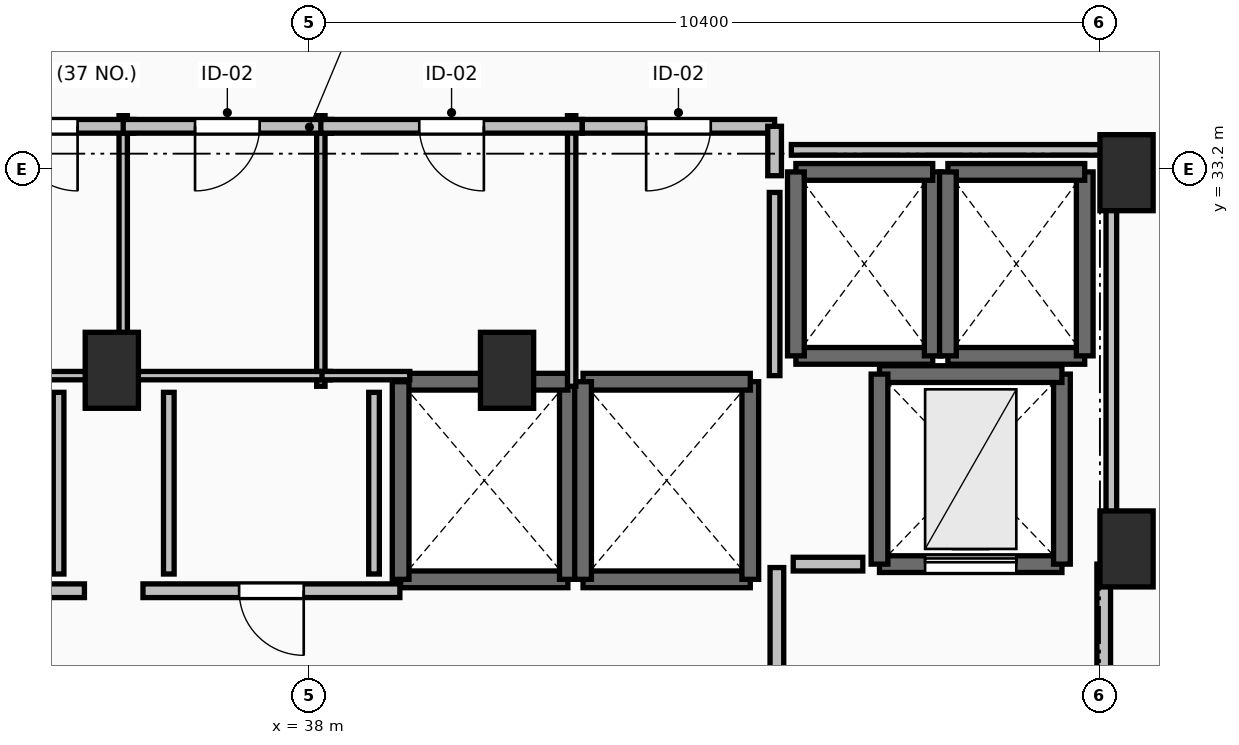
"""IFC4 building model, lengths in metres.
Left out: names, types, materials, properties, quantities, classifications, styles, units other than length and angle.
Written with IfcOpenShell. Run it as: python <this file> out.ifc"""

import sys

from ifc_helpers import new_model, si_unit, direction, frame, frame_2d, origin, origin_2d, place, context, subcontext, project, spatial, rectangle, extrude, element, fill, save


model = new_model("IFC4")
c1 = context("Model", 3, precision=1e-05, world=origin(), true_north=direction((0.0, 1.0)))
c2 = subcontext(c1, "Body", "Model", "MODEL_VIEW")
j1 = project(units=[si_unit("LENGTHUNIT", "METRE"), si_unit("PLANEANGLEUNIT", "RADIAN")], contexts=[c1])
p1 = place(None, origin())
s1 = spatial("IfcSite", under=j1, at=p1, CompositionType="ELEMENT")
p2 = place(p1, origin())
s2 = spatial("IfcBuilding", under=s1, at=p2, CompositionType="ELEMENT")
p3 = place(p2, frame((0.0, 0.0, 186.1)))
s3 = spatial("IfcBuildingStorey", under=s2, at=p3, CompositionType="ELEMENT", Elevation=186.1)
for number, where, z_axis, x_axis in (
    (1, (48.75, 33.15, 0.0), (0.0, 0.0, 1.0), (1.0, 0.0, 0.0)),
    (2, (48.75, 28.2, 0.0), (0.0, 0.0, 1.0), (1.0, 0.0, 0.0)),
    (3, (35.4, 30.55, 0.0), (0.0, 0.0, 1.0), (1.0, 0.0, 0.0)),
    (4, (40.6, 30.55, 0.0), (0.0, 0.0, 1.0), (1.0, 0.0, 0.0)),
):
    element("IfcColumn", number, at=place(p3, frame(where, z_axis=z_axis, x_axis=x_axis)), inside=s3, PredefinedType="PILASTER", context=c2, shape_type="SweptSolid", body=[
        extrude(rectangle(XDim=0.7, YDim=1.0, at=origin_2d()), origin(), (0.0, 0.0, 1.0), 3.5),
    ])
p4 = place(p3, frame((39.2, 27.8, 0.0), z_axis=(0.0, 0.0, 1.0), x_axis=(1.0, 0.0, 0.0)))
e5 = element("IfcWall", 5, at=p4, inside=s3, PredefinedType="SOLIDWALL", context=c2, shape_type="SweptSolid", body=[
    extrude(rectangle(XDim=2.2, YDim=0.22, at=frame_2d((1.1, 0.0))), origin(), (0.0, 0.0, 1.0), 3.24),
])
p5 = place(p3, frame((41.4, 27.8, 0.0), z_axis=(0.0, 0.0, 1.0), x_axis=(0.0, 1.0, 0.0)))
e6 = element("IfcWall", 6, at=p5, inside=s3, PredefinedType="SOLIDWALL", context=c2, shape_type="SweptSolid", body=[
    extrude(rectangle(XDim=2.6, YDim=0.22, at=frame_2d((1.3, 0.0))), origin(), (0.0, 0.0, 1.0), 3.24),
])
p6 = place(p3, frame((41.4, 30.4, 0.0), z_axis=(0.0, 0.0, 1.0), x_axis=(-1.0, 0.0, 0.0)))
e7 = element("IfcWall", 7, at=p6, inside=s3, PredefinedType="SOLIDWALL", context=c2, shape_type="SweptSolid", body=[
    extrude(rectangle(XDim=2.2, YDim=0.22, at=frame_2d((1.1, 0.0))), origin(), (0.0, 0.0, 1.0), 3.24),
])
p7 = place(p3, frame((39.2, 30.4, 0.0), z_axis=(0.0, 0.0, 1.0), x_axis=(0.0, -1.0, 0.0)))
e8 = element("IfcWall", 8, at=p7, inside=s3, PredefinedType="SOLIDWALL", context=c2, shape_type="SweptSolid", body=[
    extrude(rectangle(XDim=2.6, YDim=0.22, at=frame_2d((1.3, 0.0))), origin(), (0.0, 0.0, 1.0), 3.24),
])
p8 = place(p3, frame((41.6, 27.8, 0.0), z_axis=(0.0, 0.0, 1.0), x_axis=(1.0, 0.0, 0.0)))
e9 = element("IfcWall", 9, at=p8, inside=s3, PredefinedType="SOLIDWALL", context=c2, shape_type="SweptSolid", body=[
    extrude(rectangle(XDim=2.2, YDim=0.22, at=frame_2d((1.1, 0.0))), origin(), (0.0, 0.0, 1.0), 3.24),
])
p9 = place(p3, frame((43.8, 27.8, 0.0), z_axis=(0.0, 0.0, 1.0), x_axis=(0.0, 1.0, 0.0)))
e10 = element("IfcWall", 10, at=p9, inside=s3, PredefinedType="SOLIDWALL", context=c2, shape_type="SweptSolid", body=[
    extrude(rectangle(XDim=2.6, YDim=0.22, at=frame_2d((1.3, 0.0))), origin(), (0.0, 0.0, 1.0), 3.24),
])
p10 = place(p3, frame((43.8, 30.4, 0.0), z_axis=(0.0, 0.0, 1.0), x_axis=(-1.0, 0.0, 0.0)))
e11 = element("IfcWall", 11, at=p10, inside=s3, PredefinedType="SOLIDWALL", context=c2, shape_type="SweptSolid", body=[
    extrude(rectangle(XDim=2.2, YDim=0.22, at=frame_2d((1.1, 0.0))), origin(), (0.0, 0.0, 1.0), 3.24),
])
p11 = place(p3, frame((41.6, 30.4, 0.0), z_axis=(0.0, 0.0, 1.0), x_axis=(0.0, -1.0, 0.0)))
e12 = element("IfcWall", 12, at=p11, inside=s3, PredefinedType="SOLIDWALL", context=c2, shape_type="SweptSolid", body=[
    extrude(rectangle(XDim=2.6, YDim=0.22, at=frame_2d((1.3, 0.0))), origin(), (0.0, 0.0, 1.0), 3.24),
])
p12 = place(p3, frame((44.4, 30.74, 0.0), z_axis=(0.0, 0.0, 1.0), x_axis=(1.0, 0.0, 0.0)))
e13 = element("IfcWall", 13, at=p12, inside=s3, PredefinedType="SOLIDWALL", context=c2, shape_type="SweptSolid", body=[
    extrude(rectangle(XDim=1.8, YDim=0.22, at=frame_2d((0.9, 0.0))), origin(), (0.0, 0.0, 1.0), 3.24),
])
p13 = place(p3, frame((46.2, 30.74, 0.0), z_axis=(0.0, 0.0, 1.0), x_axis=(0.0, 1.0, 0.0)))
e14 = element("IfcWall", 14, at=p13, inside=s3, PredefinedType="SOLIDWALL", context=c2, shape_type="SweptSolid", body=[
    extrude(rectangle(XDim=2.42, YDim=0.22, at=frame_2d((1.21, 0.0))), origin(), (0.0, 0.0, 1.0), 3.24),
])
p14 = place(p3, frame((46.2, 33.16, 0.0), z_axis=(0.0, 0.0, 1.0), x_axis=(-1.0, 0.0, 0.0)))
e15 = element("IfcWall", 15, at=p14, inside=s3, PredefinedType="SOLIDWALL", context=c2, shape_type="SweptSolid", body=[
    extrude(rectangle(XDim=1.8, YDim=0.22, at=frame_2d((0.9, 0.0))), origin(), (0.0, 0.0, 1.0), 3.24),
])
p15 = place(p3, frame((44.4, 33.16, 0.0), z_axis=(0.0, 0.0, 1.0), x_axis=(0.0, -1.0, 0.0)))
e16 = element("IfcWall", 16, at=p15, inside=s3, PredefinedType="SOLIDWALL", context=c2, shape_type="SweptSolid", body=[
    extrude(rectangle(XDim=2.42, YDim=0.22, at=frame_2d((1.21, 0.0))), origin(), (0.0, 0.0, 1.0), 3.24),
])
p16 = place(p3, frame((46.4, 30.74, 0.0), z_axis=(0.0, 0.0, 1.0), x_axis=(1.0, 0.0, 0.0)))
e17 = element("IfcWall", 17, at=p16, inside=s3, PredefinedType="SOLIDWALL", context=c2, shape_type="SweptSolid", body=[
    extrude(rectangle(XDim=1.8, YDim=0.22, at=frame_2d((0.9, 0.0))), origin(), (0.0, 0.0, 1.0), 3.24),
])
p17 = place(p3, frame((48.2, 30.74, 0.0), z_axis=(0.0, 0.0, 1.0), x_axis=(0.0, 1.0, 0.0)))
e18 = element("IfcWall", 18, at=p17, inside=s3, PredefinedType="SOLIDWALL", context=c2, shape_type="SweptSolid", body=[
    extrude(rectangle(XDim=2.42, YDim=0.22, at=frame_2d((1.21, 0.0))), origin(), (0.0, 0.0, 1.0), 3.24),
])
p18 = place(p3, frame((48.2, 33.16, 0.0), z_axis=(0.0, 0.0, 1.0), x_axis=(-1.0, 0.0, 0.0)))
e19 = element("IfcWall", 19, at=p18, inside=s3, PredefinedType="SOLIDWALL", context=c2, shape_type="SweptSolid", body=[
    extrude(rectangle(XDim=1.8, YDim=0.22, at=frame_2d((0.9, 0.0))), origin(), (0.0, 0.0, 1.0), 3.24),
])
p19 = place(p3, frame((46.4, 33.16, 0.0), z_axis=(0.0, 0.0, 1.0), x_axis=(0.0, -1.0, 0.0)))
e20 = element("IfcWall", 20, at=p19, inside=s3, PredefinedType="SOLIDWALL", context=c2, shape_type="SweptSolid", body=[
    extrude(rectangle(XDim=2.42, YDim=0.22, at=frame_2d((1.21, 0.0))), origin(), (0.0, 0.0, 1.0), 3.24),
])
p20 = place(p3, frame((45.5, 28.0, 0.0), z_axis=(0.0, 0.0, 1.0), x_axis=(1.0, 0.0, 0.0)))
e21 = element("IfcWall", 21, at=p20, inside=s3, PredefinedType="SHEAR", context=c2, shape_type="SweptSolid", body=[
    extrude(rectangle(XDim=2.4, YDim=0.22, at=frame_2d((1.2, 0.0))), origin(), (0.0, 0.0, 1.0), 3.24),
])
p21 = place(p20, frame((0.6, 0.0, 0.0)))
e22 = element("IfcOpeningElement", 22, at=p21, cuts=e21, PredefinedType="OPENING", context=c2, shape_type="SweptSolid", body=[
    extrude(rectangle(XDim=1.2, YDim=2.2, at=frame_2d((0.6, 1.1))), frame((0.0, 0.125, 0.0), z_axis=(0.0, -1.0, 0.0), x_axis=(1.0, 0.0, 0.0)), (0.0, 0.0, 1.0), 0.25),
])
p22 = place(p3, frame((47.9, 28.0, 0.0), z_axis=(0.0, 0.0, 1.0), x_axis=(0.0, 1.0, 0.0)))
e23 = element("IfcWall", 23, at=p22, inside=s3, PredefinedType="SHEAR", context=c2, shape_type="SweptSolid", body=[
    extrude(rectangle(XDim=2.5, YDim=0.22, at=frame_2d((1.25, 0.0))), origin(), (0.0, 0.0, 1.0), 3.24),
])
p23 = place(p3, frame((47.9, 30.5, 0.0), z_axis=(0.0, 0.0, 1.0), x_axis=(-1.0, 0.0, 0.0)))
e24 = element("IfcWall", 24, at=p23, inside=s3, PredefinedType="SHEAR", context=c2, shape_type="SweptSolid", body=[
    extrude(rectangle(XDim=2.4, YDim=0.22, at=frame_2d((1.2, 0.0))), origin(), (0.0, 0.0, 1.0), 3.24),
])
p24 = place(p3, frame((45.5, 30.5, 0.0), z_axis=(0.0, 0.0, 1.0), x_axis=(0.0, -1.0, 0.0)))
e25 = element("IfcWall", 25, at=p24, inside=s3, PredefinedType="SHEAR", context=c2, shape_type="SweptSolid", body=[
    extrude(rectangle(XDim=2.5, YDim=0.22, at=frame_2d((1.25, 0.0))), origin(), (0.0, 0.0, 1.0), 3.24),
])
p25 = place(p3, frame((44.15, 27.955, 0.0), z_axis=(0.0, 0.0, 1.0), x_axis=(0.0, -1.0, 0.0)))
e26 = element("IfcWall", 26, at=p25, inside=s3, PredefinedType="PARTITIONING", context=c2, shape_type="SweptSolid", body=[
    extrude(rectangle(XDim=3.91, YDim=0.18, at=frame_2d((1.955, 0.0))), origin(), (0.0, 0.0, 1.0), 3.24),
])
p26 = place(p25, frame((1.355, 0.0, 0.0)))
e27 = element("IfcOpeningElement", 27, at=p26, cuts=e26, PredefinedType="OPENING", context=c2, shape_type="SweptSolid", body=[
    extrude(rectangle(XDim=1.2, YDim=2.15, at=frame_2d((0.6, 1.075))), frame((0.0, 0.105, 0.0), z_axis=(0.0, -1.0, 0.0), x_axis=(1.0, 0.0, 0.0)), (0.0, 0.0, 1.0), 0.21),
])
p27 = place(p3, frame((48.45, 23.95, 0.0), z_axis=(0.0, 0.0, 1.0), x_axis=(0.0, 1.0, 0.0)))
e28 = element("IfcWall", 28, at=p27, inside=s3, PredefinedType="PARTITIONING", context=c2, shape_type="SweptSolid", body=[
    extrude(rectangle(XDim=4.05, YDim=0.18, at=frame_2d((2.025, 0.0))), origin(), (0.0, 0.0, 1.0), 3.24),
])
p28 = place(p27, frame((1.425, 0.0, 0.0)))
e29 = element("IfcOpeningElement", 29, at=p28, cuts=e28, PredefinedType="OPENING", context=c2, shape_type="SweptSolid", body=[
    extrude(rectangle(XDim=1.2, YDim=2.15, at=frame_2d((0.6, 1.075))), frame((0.0, 0.105, 0.0), z_axis=(0.0, -1.0, 0.0), x_axis=(1.0, 0.0, 0.0)), (0.0, 0.0, 1.0), 0.21),
])
p29 = place(p3, frame((35.04, 27.65, 0.0), z_axis=(0.0, 0.0, 1.0), x_axis=(-1.0, 0.0, 0.0)))
e30 = element("IfcWall", 30, at=p29, inside=s3, PredefinedType="PARTITIONING", context=c2, shape_type="SweptSolid", body=[
    extrude(rectangle(XDim=3.04, YDim=0.18, at=frame_2d((1.52, 0.0))), origin(), (0.0, 0.0, 1.0), 3.24),
])
p30 = place(p29, frame((1.02, 0.0, 0.0)))
e31 = element("IfcOpeningElement", 31, at=p30, cuts=e30, PredefinedType="OPENING", context=c2, shape_type="SweptSolid", body=[
    extrude(rectangle(XDim=1.0, YDim=2.15, at=frame_2d((0.5, 1.075))), frame((0.0, 0.105, 0.0), z_axis=(0.0, -1.0, 0.0), x_axis=(1.0, 0.0, 0.0)), (0.0, 0.0, 1.0), 0.21),
])
p31 = place(p3, frame((39.19, 27.65, 0.0), z_axis=(0.0, 0.0, 1.0), x_axis=(-1.0, 0.0, 0.0)))
e32 = element("IfcWall", 32, at=p31, inside=s3, PredefinedType="PARTITIONING", context=c2, shape_type="SweptSolid", body=[
    extrude(rectangle(XDim=3.38, YDim=0.18, at=frame_2d((1.69, 0.0))), origin(), (0.0, 0.0, 1.0), 3.24),
])
p32 = place(p31, frame((1.265, 0.0, 0.0)))
e33 = element("IfcOpeningElement", 33, at=p32, cuts=e32, PredefinedType="OPENING", context=c2, shape_type="SweptSolid", body=[
    extrude(rectangle(XDim=0.85, YDim=2.1, at=frame_2d((0.425, 1.05))), frame((0.0, 0.105, 0.0), z_axis=(0.0, -1.0, 0.0), x_axis=(1.0, 0.0, 0.0)), (0.0, 0.0, 1.0), 0.21),
])
p33 = place(p3, frame((35.55, 30.34, 0.0), z_axis=(0.0, 0.0, 1.0), x_axis=(0.0, 1.0, 0.0)))
e34 = element("IfcWall", 34, at=p33, inside=s3, PredefinedType="PARTITIONING", context=c2, shape_type="SweptSolid", body=[
    extrude(rectangle(XDim=3.56, YDim=0.11, at=frame_2d((1.78, 0.0))), origin(), (0.0, 0.0, 1.0), 2.432),
])
p34 = place(p3, frame((33.36, 30.48, 0.0), z_axis=(0.0, 0.0, 1.0), x_axis=(1.0, 0.0, 0.0)))
e35 = element("IfcWall", 35, at=p34, inside=s3, PredefinedType="PARTITIONING", context=c2, shape_type="SweptSolid", body=[
    extrude(rectangle(XDim=1.81, YDim=0.11, at=frame_2d((0.905, 0.0))), origin(), (0.0, 0.0, 1.0), 3.24),
])
p35 = place(p3, frame((35.69, 33.76, 0.0), z_axis=(0.0, 0.0, 1.0), x_axis=(-1.0, 0.0, 0.0)))
e36 = element("IfcWall", 36, at=p35, inside=s3, PredefinedType="PARTITIONING", context=c2, shape_type="SweptSolid", body=[
    extrude(rectangle(XDim=2.33, YDim=0.18, at=frame_2d((1.165, 0.0))), origin(), (0.0, 0.0, 1.0), 3.24),
])
p36 = place(p35, frame((0.74, 0.0, 0.0)))
e37 = element("IfcOpeningElement", 37, at=p36, cuts=e36, PredefinedType="OPENING", context=c2, shape_type="SweptSolid", body=[
    extrude(rectangle(XDim=0.85, YDim=2.1, at=frame_2d((0.425, 1.05))), frame((0.0, 0.105, 0.0), z_axis=(0.0, -1.0, 0.0), x_axis=(1.0, 0.0, 0.0)), (0.0, 0.0, 1.0), 0.21),
])
p37 = place(p3, frame((38.15, 30.34, 0.0), z_axis=(0.0, 0.0, 1.0), x_axis=(0.0, 1.0, 0.0)))
e38 = element("IfcWall", 38, at=p37, inside=s3, PredefinedType="PARTITIONING", context=c2, shape_type="SweptSolid", body=[
    extrude(rectangle(XDim=3.56, YDim=0.11, at=frame_2d((1.78, 0.0))), origin(), (0.0, 0.0, 1.0), 2.432),
])
p38 = place(p3, frame((35.68, 30.48, 0.0), z_axis=(0.0, 0.0, 1.0), x_axis=(1.0, 0.0, 0.0)))
e39 = element("IfcWall", 39, at=p38, inside=s3, PredefinedType="PARTITIONING", context=c2, shape_type="SweptSolid", body=[
    extrude(rectangle(XDim=2.595, YDim=0.11, at=frame_2d((1.297, 0.0))), origin(), (0.0, 0.0, 1.0), 2.432),
])
p39 = place(p3, frame((38.29, 33.76, 0.0), z_axis=(0.0, 0.0, 1.0), x_axis=(-1.0, 0.0, 0.0)))
e40 = element("IfcWall", 40, at=p39, inside=s3, PredefinedType="PARTITIONING", context=c2, shape_type="SweptSolid", body=[
    extrude(rectangle(XDim=2.74, YDim=0.18, at=frame_2d((1.37, 0.0))), origin(), (0.0, 0.0, 1.0), 3.24),
])
p40 = place(p39, frame((0.945, 0.0, 0.0)))
e41 = element("IfcOpeningElement", 41, at=p40, cuts=e40, PredefinedType="OPENING", context=c2, shape_type="SweptSolid", body=[
    extrude(rectangle(XDim=0.85, YDim=2.1, at=frame_2d((0.425, 1.05))), frame((0.0, 0.105, 0.0), z_axis=(0.0, -1.0, 0.0), x_axis=(1.0, 0.0, 0.0)), (0.0, 0.0, 1.0), 0.21),
])
p41 = place(p3, frame((41.45, 30.34, 0.0), z_axis=(0.0, 0.0, 1.0), x_axis=(0.0, 1.0, 0.0)))
e42 = element("IfcWall", 42, at=p41, inside=s3, PredefinedType="PARTITIONING", context=c2, shape_type="SweptSolid", body=[
    extrude(rectangle(XDim=3.56, YDim=0.11, at=frame_2d((1.78, 0.0))), origin(), (0.0, 0.0, 1.0), 3.24),
])
p42 = place(p3, frame((38.165, 30.48, 0.0), z_axis=(0.0, 0.0, 1.0), x_axis=(1.0, 0.0, 0.0)))
e43 = element("IfcWall", 43, at=p42, inside=s3, PredefinedType="PARTITIONING", context=c2, shape_type="SweptSolid", body=[
    extrude(rectangle(XDim=1.155, YDim=0.11, at=frame_2d((0.578, 0.0))), origin(), (0.0, 0.0, 1.0), 2.432),
])
p43 = place(p3, frame((41.59, 33.76, 0.0), z_axis=(0.0, 0.0, 1.0), x_axis=(-1.0, 0.0, 0.0)))
e44 = element("IfcWall", 44, at=p43, inside=s3, PredefinedType="PARTITIONING", context=c2, shape_type="SweptSolid", body=[
    extrude(rectangle(XDim=3.44, YDim=0.18, at=frame_2d((1.72, 0.0))), origin(), (0.0, 0.0, 1.0), 3.24),
])
p44 = place(p43, frame((1.295, 0.0, 0.0)))
e45 = element("IfcOpeningElement", 45, at=p44, cuts=e44, PredefinedType="OPENING", context=c2, shape_type="SweptSolid", body=[
    extrude(rectangle(XDim=0.85, YDim=2.1, at=frame_2d((0.425, 1.05))), frame((0.0, 0.105, 0.0), z_axis=(0.0, -1.0, 0.0), x_axis=(1.0, 0.0, 0.0)), (0.0, 0.0, 1.0), 0.21),
])
p45 = place(p3, frame((44.12, 33.76, 0.0), z_axis=(0.0, 0.0, 1.0), x_axis=(-1.0, 0.0, 0.0)))
e46 = element("IfcWall", 46, at=p45, inside=s3, PredefinedType="PARTITIONING", context=c2, shape_type="SweptSolid", body=[
    extrude(rectangle(XDim=2.53, YDim=0.18, at=frame_2d((1.265, 0.0))), origin(), (0.0, 0.0, 1.0), 3.24),
])
p46 = place(p45, frame((0.84, 0.0, 0.0)))
e47 = element("IfcOpeningElement", 47, at=p46, cuts=e46, PredefinedType="OPENING", context=c2, shape_type="SweptSolid", body=[
    extrude(rectangle(XDim=0.85, YDim=2.1, at=frame_2d((0.425, 1.05))), frame((0.0, 0.105, 0.0), z_axis=(0.0, -1.0, 0.0), x_axis=(1.0, 0.0, 0.0)), (0.0, 0.0, 1.0), 0.21),
])
p47 = place(p3, frame((44.12, 33.11, 0.0), z_axis=(0.0, 0.0, 1.0), x_axis=(0.0, 1.0, 0.0)))
e48 = element("IfcWall", 48, at=p47, inside=s3, PredefinedType="PARTITIONING", context=c2, shape_type="SweptSolid", body=[
    extrude(rectangle(XDim=0.65, YDim=0.18, at=frame_2d((0.325, 0.0))), origin(), (0.0, 0.0, 1.0), 3.24),
])
p48 = place(p3, frame((45.28, 28.0, 0.0), z_axis=(0.0, 0.0, 1.0), x_axis=(-1.0, 0.0, 0.0)))
e49 = element("IfcWall", 49, at=p48, inside=s3, PredefinedType="PARTITIONING", context=c2, shape_type="SweptSolid", body=[
    extrude(rectangle(XDim=0.915, YDim=0.18, at=frame_2d((0.458, 0.0))), origin(), (0.0, 0.0, 1.0), 3.24),
])
p49 = place(p3, frame((44.12, 30.48, 0.0), z_axis=(0.0, 0.0, 1.0), x_axis=(0.0, 1.0, 0.0)))
e50 = element("IfcWall", 50, at=p49, inside=s3, PredefinedType="PARTITIONING", context=c2, shape_type="SweptSolid", body=[
    extrude(rectangle(XDim=2.41, YDim=0.14, at=frame_2d((1.205, 0.0))), origin(), (0.0, 0.0, 1.0), 3.24),
])
for number, where, z_axis, x_axis in (
    (51, (34.7, 27.87, 0.0), (0.0, 0.0, 1.0), (0.0, 1.0, 0.0)),
    (52, (36.15, 30.26, 0.0), (0.0, 0.0, 1.0), (0.0, -1.0, 0.0)),
    (53, (38.85, 27.87, 0.0), (0.0, 0.0, 1.0), (0.0, 1.0, 0.0)),
):
    element("IfcWall", number, at=place(p3, frame(where, z_axis=z_axis, x_axis=x_axis)), inside=s3, PredefinedType="PARTITIONING", context=c2, shape_type="SweptSolid", body=[
        extrude(rectangle(XDim=2.39, YDim=0.14, at=frame_2d((1.195, 0.0))), origin(), (0.0, 0.0, 1.0), 3.24),
    ])
p50 = place(p3, frame((48.55, 28.196, 0.0), z_axis=(0.0, 0.0, 1.0), x_axis=(0.0, 1.0, 0.0)))
e54 = element("IfcWall", 54, at=p50, inside=s3, PredefinedType="PARTITIONING", context=c2, shape_type="SweptSolid", body=[
    extrude(rectangle(XDim=5.254, YDim=0.14, at=frame_2d((2.627, 0.0))), origin(), (0.0, 0.0, 1.0), 2.432),
])
p51 = place(p3, frame((48.55, 33.45, 0.0), z_axis=(0.0, 0.0, 1.0), x_axis=(-1.0, 0.0, 0.0)))
e55 = element("IfcWall", 55, at=p51, inside=s3, PredefinedType="PARTITIONING", context=c2, shape_type="SweptSolid", body=[
    extrude(rectangle(XDim=4.21, YDim=0.14, at=frame_2d((2.105, 0.0))), origin(), (0.0, 0.0, 1.0), 2.432),
])
p52 = place(p21, origin())
e56 = element("IfcDoor", 56, at=p52, inside=s3, OperationType="SLIDING_TO_LEFT", PredefinedType="DOOR", context=c2, shape_type="SweptSolid", body=[
    extrude(rectangle(XDim=1.2, YDim=2.2, at=frame_2d((0.6, 1.1))), frame((0.0, 0.025, 0.0), z_axis=(0.0, -1.0, 0.0), x_axis=(1.0, 0.0, 0.0)), (0.0, 0.0, 1.0), 0.05),
])
fill(e22, e56)
p53 = place(p32, origin())
e57 = element("IfcDoor", 57, at=p53, inside=s3, OperationType="SINGLE_SWING_LEFT", PredefinedType="DOOR", context=c2, shape_type="SweptSolid", body=[
    extrude(rectangle(XDim=0.85, YDim=2.1, at=frame_2d((0.425, 1.05))), frame((0.0, 0.025, 0.0), z_axis=(0.0, -1.0, 0.0), x_axis=(1.0, 0.0, 0.0)), (0.0, 0.0, 1.0), 0.05),
])
fill(e33, e57)
p54 = place(p36, origin())
e58 = element("IfcDoor", 58, at=p54, inside=s3, OperationType="SINGLE_SWING_LEFT", PredefinedType="DOOR", context=c2, shape_type="SweptSolid", body=[
    extrude(rectangle(XDim=0.85, YDim=2.1, at=frame_2d((0.425, 1.05))), frame((0.0, 0.025, 0.0), z_axis=(0.0, -1.0, 0.0), x_axis=(1.0, 0.0, 0.0)), (0.0, 0.0, 1.0), 0.05),
])
fill(e37, e58)
p55 = place(p40, origin())
e59 = element("IfcDoor", 59, at=p55, inside=s3, OperationType="SINGLE_SWING_RIGHT", PredefinedType="DOOR", context=c2, shape_type="SweptSolid", body=[
    extrude(rectangle(XDim=0.85, YDim=2.1, at=frame_2d((0.425, 1.05))), frame((0.0, 0.025, 0.0), z_axis=(0.0, -1.0, 0.0), x_axis=(1.0, 0.0, 0.0)), (0.0, 0.0, 1.0), 0.05),
])
fill(e41, e59)
p56 = place(p44, origin())
e60 = element("IfcDoor", 60, at=p56, inside=s3, OperationType="SINGLE_SWING_LEFT", PredefinedType="DOOR", context=c2, shape_type="SweptSolid", body=[
    extrude(rectangle(XDim=0.85, YDim=2.1, at=frame_2d((0.425, 1.05))), frame((0.0, 0.025, 0.0), z_axis=(0.0, -1.0, 0.0), x_axis=(1.0, 0.0, 0.0)), (0.0, 0.0, 1.0), 0.05),
])
fill(e45, e60)
p57 = place(p46, origin())
e61 = element("IfcDoor", 61, at=p57, inside=s3, OperationType="SINGLE_SWING_RIGHT", PredefinedType="DOOR", context=c2, shape_type="SweptSolid", body=[
    extrude(rectangle(XDim=0.85, YDim=2.1, at=frame_2d((0.425, 1.05))), frame((0.0, 0.025, 0.0), z_axis=(0.0, -1.0, 0.0), x_axis=(1.0, 0.0, 0.0)), (0.0, 0.0, 1.0), 0.05),
])
fill(e47, e61)
save(model, sys.argv[1])
